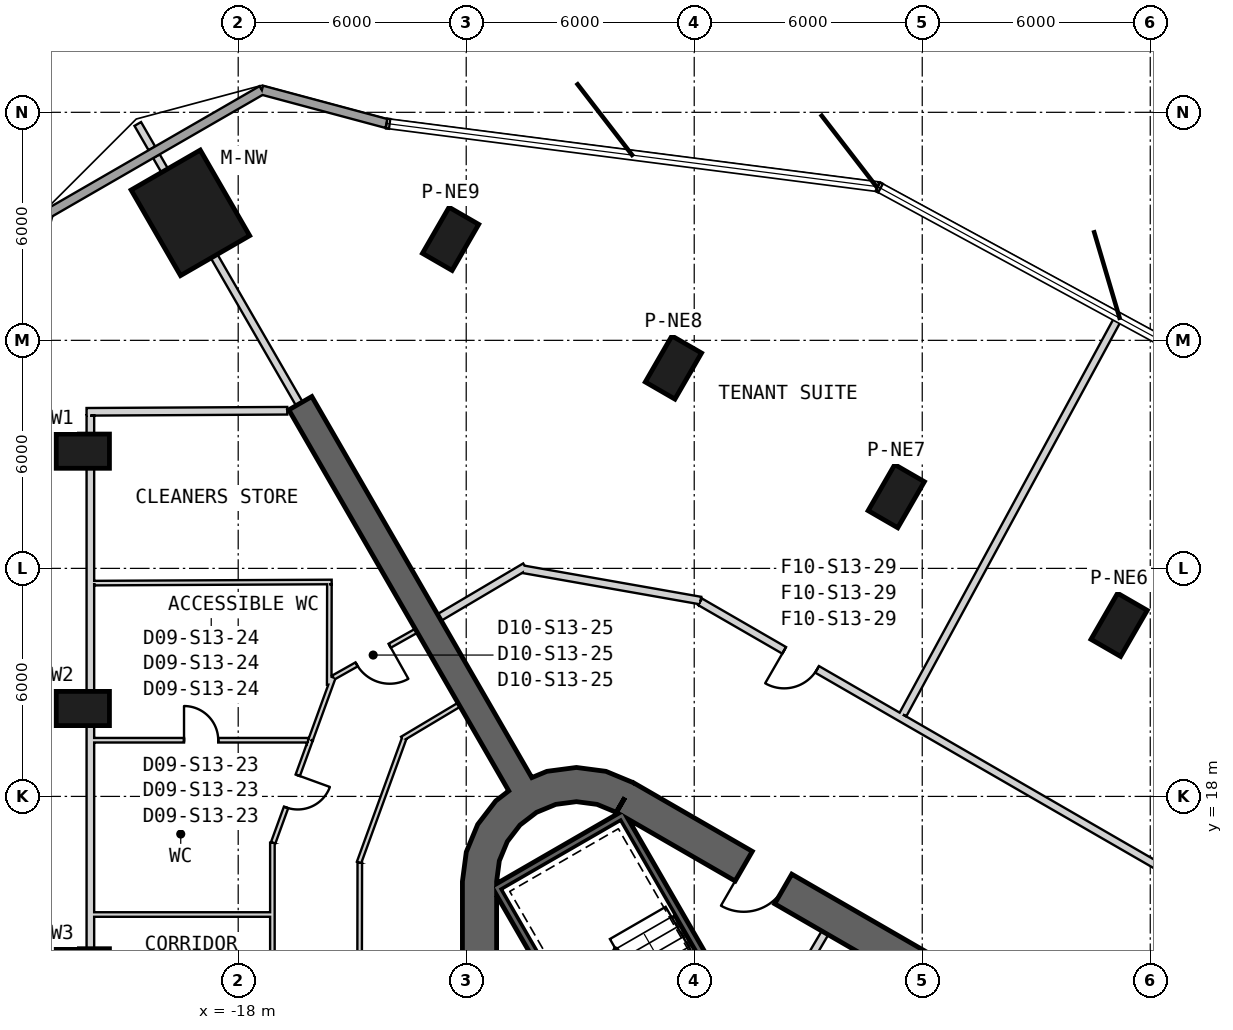
"""IFC4 building model, lengths in metres.
Left out: names, types, materials, properties, quantities, classifications, styles, units other than length and angle.
Written with IfcOpenShell. Run it as: python <this file> out.ifc"""

import sys

from ifc_helpers import new_model, si_unit, direction, frame, frame_2d, origin, origin_2d, place, context, subcontext, project, spatial, polyline, rectangle, outline, extrude, element, fill, save


model = new_model("IFC4")
c1 = context("Model", 3, precision=1e-05, world=origin(), true_north=direction((0.0, 1.0)))
c2 = subcontext(c1, "Body", "Model", "MODEL_VIEW")
j1 = project(units=[si_unit("LENGTHUNIT", "METRE"), si_unit("PLANEANGLEUNIT", "RADIAN")], contexts=[c1])
p1 = place(None, origin())
s1 = spatial("IfcSite", under=j1, at=p1, CompositionType="ELEMENT")
p2 = place(p1, origin())
s2 = spatial("IfcBuilding", under=s1, at=p2, CompositionType="ELEMENT")
p3 = place(p2, frame((0.0, 0.0, 217.2)))
s3 = spatial("IfcBuildingStorey", under=s2, at=p3, CompositionType="ELEMENT", Elevation=217.2)
p4 = place(p3, frame((-19.258, 33.355, 0.0), z_axis=(0.0, 0.0, 1.0), x_axis=(-0.5, 0.866025403784, 0.0)))
e1 = element("IfcColumn", 1, at=p4, inside=s3, PredefinedType="COLUMN", context=c2, shape_type="SweptSolid", body=[
    extrude(rectangle(XDim=2.6, YDim=2.1, at=origin_2d()), origin(), (0.0, 0.0, 1.0), 4.0),
])
for number, where, z_axis, x_axis in (
    (2, (-22.088, 27.084, 0.0), (0.0, 0.0, 1.0), (-1.0, 0.0, 0.0)),
    (3, (-22.088, 20.313, 0.0), (0.0, 0.0, 1.0), (-1.0, 0.0, 0.0)),
    (4, (-22.088, 13.542, 0.0), (0.0, 0.0, 1.0), (-1.0, 0.0, 0.0)),
    (5, (5.18, 22.514, 0.0), (0.0, 0.0, 1.0), (0.5, 0.866, 0.0)),
    (6, (-0.684, 25.9, 0.0), (0.0, 0.0, 1.0), (0.5, 0.866, 0.0)),
    (7, (-6.548, 29.285, 0.0), (0.0, 0.0, 1.0), (0.5, 0.866, 0.0)),
    (8, (-12.411, 32.671, 0.0), (0.0, 0.0, 1.0), (0.5, 0.866, 0.0)),
):
    element("IfcColumn", number, at=place(p3, frame(where, z_axis=z_axis, x_axis=x_axis)), inside=s3, PredefinedType="COLUMN", context=c2, shape_type="SweptSolid", body=[
        extrude(rectangle(XDim=1.4, YDim=0.9, at=origin_2d()), origin(), (0.0, 0.0, 1.0), 4.0),
    ])
p5 = place(p3, frame((19.475, 2.208, 0.0), z_axis=(0.0, 0.0, 1.0), x_axis=(-0.866028369851, 0.499994862586, 0.0)))
e9 = element("IfcWall", 9, at=p5, inside=s3, PredefinedType="SHEAR", context=c2, shape_type="SweptSolid", body=[
    extrude(rectangle(XDim=31.523, YDim=0.9, at=frame_2d((15.762, 0.0))), origin(), (0.0, 0.0, 1.0), 4.0),
])
p6 = place(p5, frame((7.062, 0.0, 0.0)))
e10 = element("IfcOpeningElement", 10, at=p6, cuts=e9, PredefinedType="OPENING", context=c2, shape_type="SweptSolid", body=[
    extrude(rectangle(XDim=1.2, YDim=2.4, at=frame_2d((0.6, 1.2))), frame((0.0, 0.46, 0.0), z_axis=(0.0, -1.0, 0.0), x_axis=(1.0, 0.0, 0.0)), (0.0, 0.0, 1.0), 0.92),
])
p7 = place(p5, frame((3.612, 0.0, 0.0)))
e11 = element("IfcOpeningElement", 11, at=p7, cuts=e9, PredefinedType="OPENING", context=c2, shape_type="SweptSolid", body=[
    extrude(rectangle(XDim=1.2, YDim=2.4, at=frame_2d((0.6, 1.2))), frame((0.0, 0.46, 0.0), z_axis=(0.0, -1.0, 0.0), x_axis=(1.0, 0.0, 0.0)), (0.0, 0.0, 1.0), 0.92),
])
p8 = place(p5, frame((26.712, 0.0, 0.0)))
e12 = element("IfcOpeningElement", 12, at=p8, cuts=e9, PredefinedType="OPENING", context=c2, shape_type="SweptSolid", body=[
    extrude(rectangle(XDim=1.2, YDim=2.4, at=frame_2d((0.6, 1.2))), frame((0.0, 0.46, 0.0), z_axis=(0.0, -1.0, 0.0), x_axis=(1.0, 0.0, 0.0)), (0.0, 0.0, 1.0), 0.92),
])
p9 = place(p3, frame((-11.65, 15.762, 0.0), z_axis=(0.0, 0.0, 1.0), x_axis=(0.0, -1.0, 0.0)))
e13 = element("IfcWall", 13, at=p9, inside=s3, PredefinedType="SHEAR", context=c2, shape_type="SweptSolid", body=[
    extrude(rectangle(XDim=31.523, YDim=0.9, at=frame_2d((15.762, 0.0))), origin(), (0.0, 0.0, 1.0), 4.0),
])
p10 = place(p9, frame((7.062, 0.0, 0.0)))
e14 = element("IfcOpeningElement", 14, at=p10, cuts=e13, PredefinedType="OPENING", context=c2, shape_type="SweptSolid", body=[
    extrude(rectangle(XDim=1.2, YDim=2.4, at=frame_2d((0.6, 1.2))), frame((0.0, 0.46, 0.0), z_axis=(0.0, -1.0, 0.0), x_axis=(1.0, 0.0, 0.0)), (0.0, 0.0, 1.0), 0.92),
])
p11 = place(p9, frame((9.762, 0.0, 0.0)))
e15 = element("IfcOpeningElement", 15, at=p11, cuts=e13, PredefinedType="OPENING", context=c2, shape_type="SweptSolid", body=[
    extrude(rectangle(XDim=1.2, YDim=2.4, at=frame_2d((0.6, 1.2))), frame((0.0, 0.46, 0.0), z_axis=(0.0, -1.0, 0.0), x_axis=(1.0, 0.0, 0.0)), (0.0, 0.0, 1.0), 0.92),
])
p12 = place(p9, frame((12.462, 0.0, 0.0)))
e16 = element("IfcOpeningElement", 16, at=p12, cuts=e13, PredefinedType="OPENING", context=c2, shape_type="SweptSolid", body=[
    extrude(rectangle(XDim=1.2, YDim=2.4, at=frame_2d((0.6, 1.2))), frame((0.0, 0.46, 0.0), z_axis=(0.0, -1.0, 0.0), x_axis=(1.0, 0.0, 0.0)), (0.0, 0.0, 1.0), 0.92),
])
p13 = place(p9, frame((15.162, 0.0, 0.0)))
e17 = element("IfcOpeningElement", 17, at=p13, cuts=e13, PredefinedType="OPENING", context=c2, shape_type="SweptSolid", body=[
    extrude(rectangle(XDim=1.2, YDim=2.4, at=frame_2d((0.6, 1.2))), frame((0.0, 0.46, 0.0), z_axis=(0.0, -1.0, 0.0), x_axis=(1.0, 0.0, 0.0)), (0.0, 0.0, 1.0), 0.92),
])
p14 = place(p9, frame((17.862, 0.0, 0.0)))
e18 = element("IfcOpeningElement", 18, at=p14, cuts=e13, PredefinedType="OPENING", context=c2, shape_type="SweptSolid", body=[
    extrude(rectangle(XDim=1.2, YDim=2.4, at=frame_2d((0.6, 1.2))), frame((0.0, 0.46, 0.0), z_axis=(0.0, -1.0, 0.0), x_axis=(1.0, 0.0, 0.0)), (0.0, 0.0, 1.0), 0.92),
])
p15 = place(p9, frame((20.562, 0.0, 0.0)))
e19 = element("IfcOpeningElement", 19, at=p15, cuts=e13, PredefinedType="OPENING", context=c2, shape_type="SweptSolid", body=[
    extrude(rectangle(XDim=1.2, YDim=2.4, at=frame_2d((0.6, 1.2))), frame((0.0, 0.46, 0.0), z_axis=(0.0, -1.0, 0.0), x_axis=(1.0, 0.0, 0.0)), (0.0, 0.0, 1.0), 0.92),
])
p16 = place(p9, frame((23.262, 0.0, 0.0)))
e20 = element("IfcOpeningElement", 20, at=p16, cuts=e13, PredefinedType="OPENING", context=c2, shape_type="SweptSolid", body=[
    extrude(rectangle(XDim=1.2, YDim=2.4, at=frame_2d((0.6, 1.2))), frame((0.0, 0.46, 0.0), z_axis=(0.0, -1.0, 0.0), x_axis=(1.0, 0.0, 0.0)), (0.0, 0.0, 1.0), 0.92),
])
p17 = place(p9, frame((3.612, 0.0, 0.0)))
e21 = element("IfcOpeningElement", 21, at=p17, cuts=e13, PredefinedType="OPENING", context=c2, shape_type="SweptSolid", body=[
    extrude(rectangle(XDim=1.2, YDim=2.4, at=frame_2d((0.6, 1.2))), frame((0.0, 0.46, 0.0), z_axis=(0.0, -1.0, 0.0), x_axis=(1.0, 0.0, 0.0)), (0.0, 0.0, 1.0), 0.92),
])
p18 = place(p9, frame((26.712, 0.0, 0.0)))
e22 = element("IfcOpeningElement", 22, at=p18, cuts=e13, PredefinedType="OPENING", context=c2, shape_type="SweptSolid", body=[
    extrude(rectangle(XDim=1.2, YDim=2.4, at=frame_2d((0.6, 1.2))), frame((0.0, 0.46, 0.0), z_axis=(0.0, -1.0, 0.0), x_axis=(1.0, 0.0, 0.0)), (0.0, 0.0, 1.0), 0.92),
])
p19 = place(p3, origin())
e23 = element("IfcWall", 23, at=p19, inside=s3, PredefinedType="SHEAR", context=c2, shape_type="SweptSolid", body=[
    extrude(outline(polyline([(-7.6, 18.36), (-8.323, 18.659), (-9.1, 18.762), (-9.876, 18.659), (-10.6, 18.36), (-11.221, 17.883), (-11.698, 17.262), (-11.998, 16.538), (-12.1, 15.762), (-11.2, 15.762), (-11.128, 16.305), (-10.919, 16.812), (-10.585, 17.247), (-10.15, 17.58), (-9.644, 17.79), (-9.1, 17.862), (-8.556, 17.79), (-8.05, 17.58), (-7.6, 18.36)])), origin(), (0.0, 0.0, 1.0), 4.0),
])
p20 = place(p3, frame((-10.575, 18.316, 0.0), z_axis=(0.0, 0.0, 1.0), x_axis=(-0.499998001389, 0.86602655768, 0.0)))
e24 = element("IfcWall", 24, at=p20, inside=s3, PredefinedType="SHEAR", context=c2, shape_type="SweptSolid", body=[
    extrude(rectangle(XDim=11.581, YDim=0.7, at=frame_2d((5.791, 0.0))), origin(), (0.0, 0.0, 1.0), 4.0),
])
p21 = place(p3, frame((-14.095, 35.705, 0.0), z_axis=(0.0, 0.0, 1.0), x_axis=(-0.965908597484, 0.258883335322, 0.0)))
e25 = element("IfcWall", 25, at=p21, inside=s3, PredefinedType="SOLIDWALL", context=c2, shape_type="SweptSolid", body=[
    extrude(rectangle(XDim=3.398, YDim=0.24, at=frame_2d((1.699, 0.0))), origin(), (0.0, 0.0, 1.0), 3.7),
])
p22 = place(p3, frame((-17.377, 36.585, 0.0), z_axis=(0.0, 0.0, 1.0), x_axis=(-0.866022628259, -0.50000480732, 0.0)))
e26 = element("IfcWall", 26, at=p22, inside=s3, PredefinedType="SOLIDWALL", context=c2, shape_type="SweptSolid", body=[
    extrude(rectangle(XDim=6.487, YDim=0.24, at=frame_2d((3.243, 0.0))), origin(), (0.0, 0.0, 1.0), 3.7),
])
p23 = place(p3, frame((-22.995, 33.342, 0.0), z_axis=(0.0, 0.0, 1.0), x_axis=(-0.25879706975, -0.965931714299, 0.0)))
e27 = element("IfcWall", 27, at=p23, inside=s3, PredefinedType="SOLIDWALL", context=c2, shape_type="SweptSolid", body=[
    extrude(rectangle(XDim=3.402, YDim=0.24, at=frame_2d((1.701, 0.0))), origin(), (0.0, 0.0, 1.0), 3.7),
])
p24 = place(p3, frame((-11.245, 15.678, -0.3), z_axis=(0.0, 0.0, 1.0), x_axis=(0.499977274689, -0.866038523851, 0.0)))
e28 = element("IfcWall", 28, at=p24, inside=s3, PredefinedType="SHEAR", context=c2, shape_type="SweptSolid", body=[
    extrude(rectangle(XDim=8.1, YDim=0.2, at=frame_2d((4.05, 0.0))), origin(), (0.0, 0.0, 1.0), 4.0),
])
p25 = place(p3, frame((-7.818, 17.541, -0.3), z_axis=(0.0, 0.0, 1.0), x_axis=(-0.866044365799, -0.499967155389, 0.0)))
e29 = element("IfcWall", 29, at=p25, inside=s3, PredefinedType="SHEAR", context=c2, shape_type="SweptSolid", body=[
    extrude(rectangle(XDim=3.8, YDim=0.2, at=frame_2d((1.9, 0.0))), origin(), (0.0, 0.0, 1.0), 4.0),
])
p26 = place(p3, frame((-7.854, 17.405, -0.3), z_axis=(0.0, 0.0, 1.0), x_axis=(0.499997992926, -0.866026562566, 0.0)))
e30 = element("IfcWall", 30, at=p26, inside=s3, PredefinedType="SHEAR", context=c2, shape_type="SweptSolid", body=[
    extrude(rectangle(XDim=7.9, YDim=0.2, at=frame_2d((3.95, 0.0))), origin(), (0.0, 0.0, 1.0), 4.0),
])
p27 = place(p3, frame((-2.558, 14.409, 0.0), z_axis=(0.0, 0.0, 1.0), x_axis=(-0.508018930956, -0.861345903683, 0.0)))
e31 = element("IfcWall", 31, at=p27, inside=s3, PredefinedType="PARTITIONING", context=c2, shape_type="SweptSolid", body=[
    extrude(rectangle(XDim=3.15, YDim=0.2, at=frame_2d((1.575, 0.0))), origin(), (0.0, 0.0, 1.0), 3.7),
])
p28 = place(p3, frame((-12.189, 20.411, 0.0), z_axis=(0.0, 0.0, 1.0), x_axis=(-0.858492721014, -0.51282574815, 0.0)))
e32 = element("IfcWall", 32, at=p28, inside=s3, PredefinedType="PARTITIONING", context=c2, shape_type="SweptSolid", body=[
    extrude(rectangle(XDim=1.742, YDim=0.12, at=frame_2d((0.871, 0.0))), origin(), (0.0, 0.0, 1.0), 3.7),
])
p29 = place(p3, frame((-13.631, 19.53, 0.0), z_axis=(0.0, 0.0, 1.0), x_axis=(-0.342069878069, -0.939674517329, 0.0)))
e33 = element("IfcWall", 33, at=p29, inside=s3, PredefinedType="PARTITIONING", context=c2, shape_type="SweptSolid", body=[
    extrude(rectangle(XDim=3.479, YDim=0.12, at=frame_2d((1.739, 0.0))), origin(), (0.0, 0.0, 1.0), 2.78),
])
p30 = place(p3, frame((-14.8, 16.257, 0.0), z_axis=(0.0, 0.0, 1.0), x_axis=(-0.001847148781, -0.999998294019, 0.0)))
e34 = element("IfcWall", 34, at=p30, inside=s3, PredefinedType="PARTITIONING", context=c2, shape_type="SweptSolid", body=[
    extrude(rectangle(XDim=16.257, YDim=0.12, at=frame_2d((8.128, 0.0))), origin(), (0.0, 0.0, 1.0), 2.88),
])
p31 = place(p30, frame((7.629, 0.0, 0.0)))
e35 = element("IfcOpeningElement", 35, at=p31, cuts=e34, PredefinedType="OPENING", context=c2, shape_type="SweptSolid", body=[
    extrude(rectangle(XDim=1.0, YDim=2.1, at=frame_2d((0.5, 1.05))), frame((0.0, 0.07, 0.0), z_axis=(0.0, -1.0, 0.0), x_axis=(1.0, 0.0, 0.0)), (0.0, 0.0, 1.0), 0.14),
])
p32 = place(p3, frame((-17.1, 16.783, 0.0), z_axis=(0.0, 0.0, 1.0), x_axis=(0.0, -1.0, 0.0)))
e36 = element("IfcWall", 36, at=p32, inside=s3, PredefinedType="PARTITIONING", context=c2, shape_type="SweptSolid", body=[
    extrude(rectangle(XDim=6.613, YDim=0.12, at=frame_2d((3.306, 0.0))), origin(), (0.0, 0.0, 1.0), 2.88),
])
p33 = place(p32, frame((3.751, 0.0, 0.0)))
e37 = element("IfcOpeningElement", 37, at=p33, cuts=e36, PredefinedType="OPENING", context=c2, shape_type="SweptSolid", body=[
    extrude(rectangle(XDim=1.0, YDim=2.1, at=frame_2d((0.5, 1.05))), frame((0.0, 0.07, 0.0), z_axis=(0.0, -1.0, 0.0), x_axis=(1.0, 0.0, 0.0)), (0.0, 0.0, 1.0), 0.14),
])
p34 = place(p3, frame((-15.496, 21.129, 0.0), z_axis=(0.0, 0.0, 1.0), x_axis=(-0.342023613346, -0.939691357795, 0.0)))
e38 = element("IfcWall", 38, at=p34, inside=s3, PredefinedType="PARTITIONING", context=c2, shape_type="SweptSolid", body=[
    extrude(rectangle(XDim=1.747, YDim=0.12, at=frame_2d((0.873, 0.0))), origin(), (0.0, 0.0, 1.0), 2.78),
])
p35 = place(p3, frame((-16.094, 19.488, 0.0), z_axis=(0.0, 0.0, 1.0), x_axis=(-0.342028686382, -0.939689511324, 0.0)))
e39 = element("IfcWall", 39, at=p35, inside=s3, PredefinedType="PARTITIONING", context=c2, shape_type="SweptSolid", body=[
    extrude(rectangle(XDim=2.882, YDim=0.12, at=frame_2d((1.441, 0.0))), origin(), (0.0, 0.0, 1.0), 2.78),
])
p36 = place(p35, frame((0.991, 0.0, 0.0)))
e40 = element("IfcOpeningElement", 40, at=p36, cuts=e39, PredefinedType="OPENING", context=c2, shape_type="SweptSolid", body=[
    extrude(rectangle(XDim=0.9, YDim=2.1, at=frame_2d((0.45, 1.05))), frame((0.0, 0.07, 0.0), z_axis=(0.0, -1.0, 0.0), x_axis=(1.0, 0.0, 0.0)), (0.0, 0.0, 1.0), 0.14),
])
p37 = place(p3, frame((-13.313, 22.359, 0.0), z_axis=(0.0, 0.0, 1.0), x_axis=(-0.87126053708, -0.490820819167, 0.0)))
e41 = element("IfcWall", 41, at=p37, inside=s3, PredefinedType="PARTITIONING", context=c2, shape_type="SweptSolid", body=[
    extrude(rectangle(XDim=2.506, YDim=0.12, at=frame_2d((1.253, 0.0))), origin(), (0.0, 0.0, 1.0), 3.7),
])
p38 = place(p37, frame((0.803, 0.0, 0.0)))
e42 = element("IfcOpeningElement", 42, at=p38, cuts=e41, PredefinedType="OPENING", context=c2, shape_type="SweptSolid", body=[
    extrude(rectangle(XDim=1.0, YDim=2.1, at=frame_2d((0.5, 1.05))), frame((0.0, 0.07, 0.0), z_axis=(0.0, -1.0, 0.0), x_axis=(1.0, 0.0, 0.0)), (0.0, 0.0, 1.0), 0.14),
])
p39 = place(p3, frame((-10.449, 24.044, 0.0), z_axis=(0.0, 0.0, 1.0), x_axis=(-0.860744847861, -0.509036645912, 0.0)))
e43 = element("IfcWall", 43, at=p39, inside=s3, PredefinedType="PARTITIONING", context=c2, shape_type="SweptSolid", body=[
    extrude(rectangle(XDim=2.623, YDim=0.2, at=frame_2d((1.311, 0.0))), origin(), (0.0, 0.0, 1.0), 3.7),
])
p40 = place(p3, frame((-5.834, 23.153, 0.0), z_axis=(0.0, 0.0, 1.0), x_axis=(-0.98481258102, 0.173620794447, 0.0)))
e44 = element("IfcWall", 44, at=p40, inside=s3, PredefinedType="PARTITIONING", context=c2, shape_type="SweptSolid", body=[
    extrude(rectangle(XDim=4.74, YDim=0.2, at=frame_2d((2.37, 0.0))), origin(), (0.0, 0.0, 1.0), 2.78),
])
p41 = place(p3, frame((10.325, 13.784, 0.0), z_axis=(0.0, 0.0, 1.0), x_axis=(-0.866025119466, 0.500000492453, 0.0)))
e45 = element("IfcWall", 45, at=p41, inside=s3, PredefinedType="PARTITIONING", context=c2, shape_type="SweptSolid", body=[
    extrude(rectangle(XDim=18.673, YDim=0.2, at=frame_2d((9.336, 0.0))), origin(), (0.0, 0.0, 1.0), 2.88),
])
p42 = place(p41, frame((15.118, 0.0, 0.0)))
e46 = element("IfcOpeningElement", 46, at=p42, cuts=e45, PredefinedType="OPENING", context=c2, shape_type="SweptSolid", body=[
    extrude(rectangle(XDim=1.0, YDim=2.1, at=frame_2d((0.5, 1.05))), frame((0.0, 0.11, 0.0), z_axis=(0.0, -1.0, 0.0), x_axis=(1.0, 0.0, 0.0)), (0.0, 0.0, 1.0), 0.22),
])
p43 = place(p3, frame((-20.643, 35.694, 0.0), z_axis=(0.0, 0.0, 1.0), x_axis=(0.500178781653, -0.865922159541, 0.0)))
e47 = element("IfcWall", 47, at=p43, inside=s3, PredefinedType="PARTITIONING", context=c2, shape_type="SweptSolid", body=[
    extrude(rectangle(XDim=0.741, YDim=0.2, at=frame_2d((0.371, 0.0))), origin(), (0.0, 0.0, 1.0), 3.7),
])
p44 = place(p3, frame((-20.152, 34.844, 0.0), z_axis=(0.0, 0.0, 1.0), x_axis=(0.500286910726, -0.865859692419, 0.0)))
e48 = element("IfcWall", 48, at=p44, inside=s3, PredefinedType="PARTITIONING", context=c2, shape_type="SweptSolid", body=[
    extrude(rectangle(XDim=0.437, YDim=0.2, at=frame_2d((0.218, 0.0))), origin(), (0.0, 0.0, 1.0), 3.7),
])
p45 = place(p3, frame((-18.634, 32.214, 0.0), z_axis=(0.0, 0.0, 1.0), x_axis=(0.499962811355, -0.866046873594, 0.0)))
e49 = element("IfcWall", 49, at=p45, inside=s3, PredefinedType="PARTITIONING", context=c2, shape_type="SweptSolid", body=[
    extrude(rectangle(XDim=4.484, YDim=0.2, at=frame_2d((2.242, 0.0))), origin(), (0.0, 0.0, 1.0), 3.27),
])
p46 = place(p3, frame((-21.89, 10.0, 0.0), z_axis=(0.0, 0.0, 1.0), x_axis=(0.0, 1.0, 0.0)))
e50 = element("IfcWall", 50, at=p46, inside=s3, PredefinedType="PARTITIONING", context=c2, shape_type="SweptSolid", body=[
    extrude(rectangle(XDim=9.478, YDim=0.2, at=frame_2d((4.739, 0.0))), origin(), (0.0, 0.0, 1.0), 3.7),
])
p47 = place(p3, frame((-21.89, 19.478, 0.0), z_axis=(0.0, 0.0, 1.0), x_axis=(0.0, 1.0, 0.0)))
e51 = element("IfcWall", 51, at=p47, inside=s3, PredefinedType="PARTITIONING", context=c2, shape_type="SweptSolid", body=[
    extrude(rectangle(XDim=4.134, YDim=0.2, at=frame_2d((2.067, 0.0))), origin(), (0.0, 0.0, 1.0), 3.7),
])
p48 = place(p3, frame((-21.89, 23.612, 0.0), z_axis=(0.0, 0.0, 1.0), x_axis=(0.0, 1.0, 0.0)))
e52 = element("IfcWall", 52, at=p48, inside=s3, PredefinedType="PARTITIONING", context=c2, shape_type="SweptSolid", body=[
    extrude(rectangle(XDim=4.408, YDim=0.2, at=frame_2d((2.204, 0.0))), origin(), (0.0, 0.0, 1.0), 2.78),
])
p49 = place(p3, frame((-16.709, 28.147, 0.0), z_axis=(0.0, 0.0, 1.0), x_axis=(-0.999985868011, -0.00531636886, 0.0)))
e53 = element("IfcWall", 53, at=p49, inside=s3, PredefinedType="PARTITIONING", context=c2, shape_type="SweptSolid", body=[
    extrude(rectangle(XDim=5.281, YDim=0.2, at=frame_2d((2.641, 0.0))), origin(), (0.0, 0.0, 1.0), 3.7),
])
p50 = place(p3, frame((-0.508, 20.154, 0.0), z_axis=(0.0, 0.0, 1.0), x_axis=(0.477264499804, 0.878759692536, 0.0)))
e54 = element("IfcWall", 54, at=p50, inside=s3, PredefinedType="PARTITIONING", context=c2, shape_type="SweptSolid", body=[
    extrude(rectangle(XDim=11.89, YDim=0.2, at=frame_2d((5.945, 0.0))), origin(), (0.0, 0.0, 1.0), 2.98),
])
p51 = place(p3, frame((-21.79, 14.892, 0.0), z_axis=(0.0, 0.0, 1.0), x_axis=(1.0, 0.0, 0.0)))
e55 = element("IfcWall", 55, at=p51, inside=s3, PredefinedType="PARTITIONING", context=c2, shape_type="SweptSolid", body=[
    extrude(rectangle(XDim=4.63, YDim=0.12, at=frame_2d((2.315, 0.0))), origin(), (0.0, 0.0, 1.0), 3.7),
])
p52 = place(p3, frame((-21.79, 19.478, 0.0), z_axis=(0.0, 0.0, 1.0), x_axis=(1.0, 0.0, 0.0)))
e56 = element("IfcWall", 56, at=p52, inside=s3, PredefinedType="PARTITIONING", context=c2, shape_type="SweptSolid", body=[
    extrude(rectangle(XDim=5.629, YDim=0.12, at=frame_2d((2.814, 0.0))), origin(), (0.0, 0.0, 1.0), 2.88),
])
p53 = place(p52, frame((2.365, 0.0, 0.0)))
e57 = element("IfcOpeningElement", 57, at=p53, cuts=e56, PredefinedType="OPENING", context=c2, shape_type="SweptSolid", body=[
    extrude(rectangle(XDim=0.9, YDim=2.1, at=frame_2d((0.45, 1.05))), frame((0.0, 0.07, 0.0), z_axis=(0.0, -1.0, 0.0), x_axis=(1.0, 0.0, 0.0)), (0.0, 0.0, 1.0), 0.14),
])
p54 = place(p3, frame((-21.79, 23.612, 0.0), z_axis=(0.0, 0.0, 1.0), x_axis=(0.999988644603, 0.004765570884, 0.0)))
e58 = element("IfcWall", 58, at=p54, inside=s3, PredefinedType="PARTITIONING", context=c2, shape_type="SweptSolid", body=[
    extrude(rectangle(XDim=6.25, YDim=0.12, at=frame_2d((3.125, 0.0))), origin(), (0.0, 0.0, 1.0), 2.78),
])
p55 = place(p3, frame((-15.605, 20.939, 0.0), z_axis=(0.0, 0.0, 1.0), x_axis=(0.001847571904, 0.999998293238, 0.0)))
e59 = element("IfcWall", 59, at=p55, inside=s3, PredefinedType="PARTITIONING", context=c2, shape_type="SweptSolid", body=[
    extrude(rectangle(XDim=2.643, YDim=0.12, at=frame_2d((1.321, 0.0))), origin(), (0.0, 0.0, 1.0), 3.7),
])
p56 = place(p36, origin())
e60 = element("IfcDoor", 60, at=p56, inside=s3, OperationType="SINGLE_SWING_LEFT", PredefinedType="NOTDEFINED", context=c2, shape_type="SweptSolid", body=[
    extrude(rectangle(XDim=0.9, YDim=2.1, at=frame_2d((0.45, 1.05))), frame((0.0, 0.025, 0.0), z_axis=(0.0, -1.0, 0.0), x_axis=(1.0, 0.0, 0.0)), (0.0, 0.0, 1.0), 0.05),
])
fill(e40, e60)
p57 = place(p53, origin())
e61 = element("IfcDoor", 61, at=p57, inside=s3, OperationType="SINGLE_SWING_LEFT", PredefinedType="NOTDEFINED", context=c2, shape_type="SweptSolid", body=[
    extrude(rectangle(XDim=0.9, YDim=2.1, at=frame_2d((0.45, 1.05))), frame((0.0, 0.025, 0.0), z_axis=(0.0, -1.0, 0.0), x_axis=(1.0, 0.0, 0.0)), (0.0, 0.0, 1.0), 0.05),
])
fill(e57, e61)
p58 = place(p38, origin())
e62 = element("IfcDoor", 62, at=p58, inside=s3, OperationType="SINGLE_SWING_LEFT", PredefinedType="NOTDEFINED", context=c2, shape_type="SweptSolid", body=[
    extrude(rectangle(XDim=1.0, YDim=2.1, at=frame_2d((0.5, 1.05))), frame((0.0, 0.025, 0.0), z_axis=(0.0, -1.0, 0.0), x_axis=(1.0, 0.0, 0.0)), (0.0, 0.0, 1.0), 0.05),
])
fill(e42, e62)
p59 = place(p42, origin())
e63 = element("IfcDoor", 63, at=p59, inside=s3, OperationType="SINGLE_SWING_LEFT", PredefinedType="USERDEFINED", context=c2, shape_type="SweptSolid", body=[
    extrude(rectangle(XDim=1.0, YDim=2.1, at=frame_2d((0.5, 1.05))), frame((0.0, 0.025, 0.0), z_axis=(0.0, -1.0, 0.0), x_axis=(1.0, 0.0, 0.0)), (0.0, 0.0, 1.0), 0.05),
])
fill(e46, e63)
p60 = place(p8, origin())
e64 = element("IfcDoor", 64, at=p60, inside=s3, OperationType="SINGLE_SWING_LEFT", PredefinedType="USERDEFINED", context=c2, shape_type="SweptSolid", body=[
    extrude(rectangle(XDim=1.2, YDim=2.4, at=frame_2d((0.6, 1.2))), frame((0.0, 0.025, 0.0), z_axis=(0.0, -1.0, 0.0), x_axis=(1.0, 0.0, 0.0)), (0.0, 0.0, 1.0), 0.05),
])
fill(e12, e64)
save(model, sys.argv[1])
